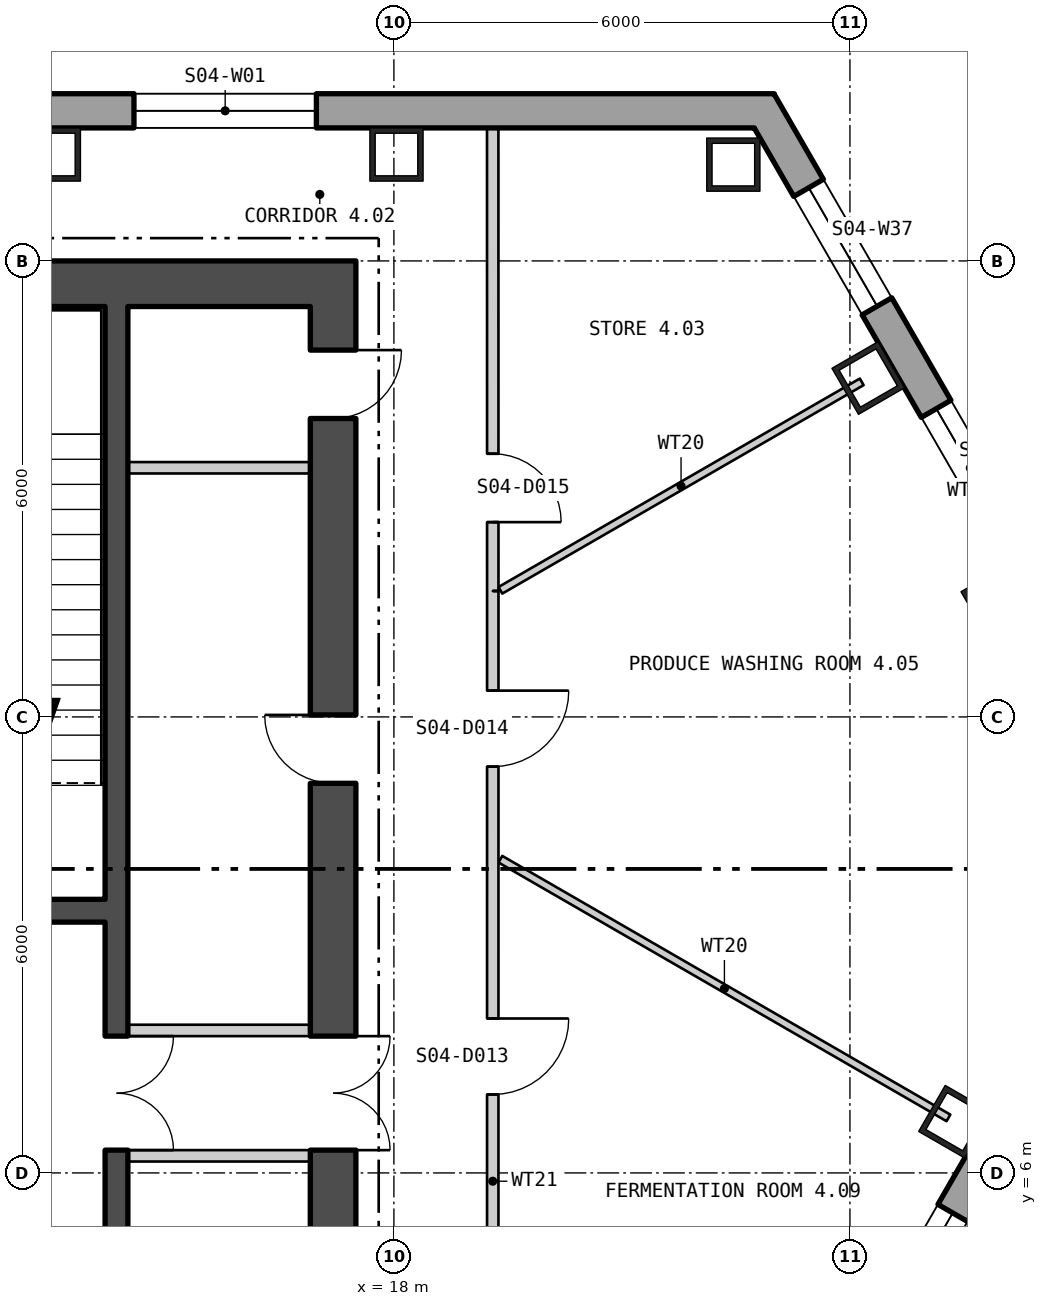
"""IFC4 building model, lengths in metres.
Left out: names, types, materials, properties, quantities, classifications, styles, units other than length and angle.
Written with IfcOpenShell. Run it as: python <this file> out.ifc"""

import sys

from ifc_helpers import new_model, si_unit, direction, frame, frame_2d, origin, origin_2d, place, context, subcontext, project, spatial, polyline, rectangle, hollow_rectangle, outline, extrude, element, fill, save


model = new_model("IFC4")
c1 = context("Model", 3, precision=1e-05, world=origin(), true_north=direction((0.0, 1.0)))
c2 = subcontext(c1, "Body", "Model", "MODEL_VIEW")
j1 = project(units=[si_unit("LENGTHUNIT", "METRE"), si_unit("PLANEANGLEUNIT", "RADIAN")], contexts=[c1])
p1 = place(None, origin())
s1 = spatial("IfcSite", under=j1, at=p1, CompositionType="ELEMENT")
p2 = place(p1, origin())
s2 = spatial("IfcBuilding", under=s1, at=p2, CompositionType="ELEMENT")
p3 = place(p2, frame((0.0, 0.0, 60.3)))
s3 = spatial("IfcBuildingStorey", under=s2, at=p3, CompositionType="ELEMENT", Elevation=60.3)
for number, where, z_axis, x_axis in (
    (1, (22.466, 19.267, 0.0), (0.0, 0.0, 1.0), (-1.0, 0.0, 0.0)),
    (2, (18.034, 19.4, 0.0), (0.0, 0.0, 1.0), (-1.0, 0.0, 0.0)),
    (3, (13.526, 19.4, 0.0), (0.0, 0.0, 1.0), (-1.0, 0.0, 0.0)),
    (4, (25.382, 6.674, 0.0), (0.0, 0.0, 1.0), (0.5, 0.866, 0.0)),
    (5, (25.939, 13.519, 0.0), (0.0, 0.0, 1.0), (-0.5, 0.866, 0.0)),
    (6, (24.241, 16.459, 0.0), (0.0, 0.0, 1.0), (-0.5, 0.866, 0.0)),
):
    element("IfcColumn", number, at=place(p3, frame(where, z_axis=z_axis, x_axis=x_axis)), inside=s3, PredefinedType="COLUMN", context=c2, shape_type="SweptSolid", body=[
        extrude(hollow_rectangle(XDim=0.7, YDim=0.7, WallThickness=0.07, at=origin_2d()), origin(), (0.0, 0.0, 1.0), 4.5),
    ])
p4 = place(p3, frame((22.875, 19.975, -0.4), z_axis=(0.0, 0.0, 1.0), x_axis=(-1.0, 0.0, 0.0)))
e7 = element("IfcWall", 7, at=p4, inside=s3, PredefinedType="SOLIDWALL", context=c2, shape_type="SweptSolid", body=[
    extrude(outline(polyline([(-0.13, -0.225), (45.88, -0.225), (45.62, 0.225), (0.13, 0.225), (-0.13, -0.225)])), origin(), (0.0, 0.0, 1.0), 4.5),
])
p5 = place(p4, frame((5.895, 0.0, 1.3)))
e8 = element("IfcOpeningElement", 8, at=p5, cuts=e7, PredefinedType="OPENING", context=c2, shape_type="SweptSolid", body=[
    extrude(rectangle(XDim=2.4, YDim=2.6, at=frame_2d((1.2, 1.3))), frame((0.0, 0.235, 0.0), z_axis=(0.0, -1.0, 0.0), x_axis=(1.0, 0.0, 0.0)), (0.0, 0.0, 1.0), 0.47),
])
p6 = place(p4, frame((10.403, 0.0, 1.3)))
e9 = element("IfcOpeningElement", 9, at=p6, cuts=e7, PredefinedType="OPENING", context=c2, shape_type="SweptSolid", body=[
    extrude(rectangle(XDim=2.4, YDim=2.6, at=frame_2d((1.2, 1.3))), frame((0.0, 0.235, 0.0), z_axis=(0.0, -1.0, 0.0), x_axis=(1.0, 0.0, 0.0)), (0.0, 0.0, 1.0), 0.47),
])
p7 = place(p4, frame((14.912, 0.0, 1.3)))
e10 = element("IfcOpeningElement", 10, at=p7, cuts=e7, PredefinedType="OPENING", context=c2, shape_type="SweptSolid", body=[
    extrude(rectangle(XDim=2.4, YDim=2.6, at=frame_2d((1.2, 1.3))), frame((0.0, 0.235, 0.0), z_axis=(0.0, -1.0, 0.0), x_axis=(1.0, 0.0, 0.0)), (0.0, 0.0, 1.0), 0.47),
])
p8 = place(p4, frame((19.421, 0.0, 1.3)))
e11 = element("IfcOpeningElement", 11, at=p8, cuts=e7, PredefinedType="OPENING", context=c2, shape_type="SweptSolid", body=[
    extrude(rectangle(XDim=2.4, YDim=2.6, at=frame_2d((1.2, 1.3))), frame((0.0, 0.235, 0.0), z_axis=(0.0, -1.0, 0.0), x_axis=(1.0, 0.0, 0.0)), (0.0, 0.0, 1.0), 0.47),
])
p9 = place(p4, frame((23.929, 0.0, 1.3)))
e12 = element("IfcOpeningElement", 12, at=p9, cuts=e7, PredefinedType="OPENING", context=c2, shape_type="SweptSolid", body=[
    extrude(rectangle(XDim=2.4, YDim=2.6, at=frame_2d((1.2, 1.3))), frame((0.0, 0.235, 0.0), z_axis=(0.0, -1.0, 0.0), x_axis=(1.0, 0.0, 0.0)), (0.0, 0.0, 1.0), 0.47),
])
p10 = place(p4, frame((28.438, 0.0, 1.3)))
e13 = element("IfcOpeningElement", 13, at=p10, cuts=e7, PredefinedType="OPENING", context=c2, shape_type="SweptSolid", body=[
    extrude(rectangle(XDim=2.4, YDim=2.6, at=frame_2d((1.2, 1.3))), frame((0.0, 0.235, 0.0), z_axis=(0.0, -1.0, 0.0), x_axis=(1.0, 0.0, 0.0)), (0.0, 0.0, 1.0), 0.47),
])
p11 = place(p4, frame((32.947, 0.0, 1.3)))
e14 = element("IfcOpeningElement", 14, at=p11, cuts=e7, PredefinedType="OPENING", context=c2, shape_type="SweptSolid", body=[
    extrude(rectangle(XDim=2.4, YDim=2.6, at=frame_2d((1.2, 1.3))), frame((0.0, 0.235, 0.0), z_axis=(0.0, -1.0, 0.0), x_axis=(1.0, 0.0, 0.0)), (0.0, 0.0, 1.0), 0.47),
])
p12 = place(p4, frame((37.455, 0.0, 1.3)))
e15 = element("IfcOpeningElement", 15, at=p12, cuts=e7, PredefinedType="OPENING", context=c2, shape_type="SweptSolid", body=[
    extrude(rectangle(XDim=2.4, YDim=2.6, at=frame_2d((1.2, 1.3))), frame((0.0, 0.235, 0.0), z_axis=(0.0, -1.0, 0.0), x_axis=(1.0, 0.0, 0.0)), (0.0, 0.0, 1.0), 0.47),
])
p13 = place(p3, frame((5.425, -29.042, -0.18), z_axis=(0.0, 0.0, 1.0), x_axis=(0.499999388847, 0.866025756634, 0.0)))
e16 = element("IfcWall", 16, at=p13, inside=s3, PredefinedType="SOLIDWALL", context=c2, shape_type="SweptSolid", body=[
    extrude(outline(polyline([(-0.13, -0.225), (45.88, -0.225), (45.62, 0.225), (0.13, 0.225), (-0.13, -0.225)])), origin(), (0.0, 0.0, 1.0), 4.28),
])
p14 = place(p13, frame((1.425, 0.0, 1.08)))
e17 = element("IfcOpeningElement", 17, at=p14, cuts=e16, PredefinedType="OPENING", context=c2, shape_type="SweptSolid", body=[
    extrude(rectangle(XDim=2.4, YDim=2.6, at=frame_2d((1.2, 1.3))), frame((0.0, 0.235, 0.0), z_axis=(0.0, -1.0, 0.0), x_axis=(1.0, 0.0, 0.0)), (0.0, 0.0, 1.0), 0.47),
])
p15 = place(p13, frame((5.895, 0.0, 1.08)))
e18 = element("IfcOpeningElement", 18, at=p15, cuts=e16, PredefinedType="OPENING", context=c2, shape_type="SweptSolid", body=[
    extrude(rectangle(XDim=2.4, YDim=2.6, at=frame_2d((1.2, 1.3))), frame((0.0, 0.235, 0.0), z_axis=(0.0, -1.0, 0.0), x_axis=(1.0, 0.0, 0.0)), (0.0, 0.0, 1.0), 0.47),
])
p16 = place(p13, frame((10.403, 0.0, 1.08)))
e19 = element("IfcOpeningElement", 19, at=p16, cuts=e16, PredefinedType="OPENING", context=c2, shape_type="SweptSolid", body=[
    extrude(rectangle(XDim=2.4, YDim=2.6, at=frame_2d((1.2, 1.3))), frame((0.0, 0.235, 0.0), z_axis=(0.0, -1.0, 0.0), x_axis=(1.0, 0.0, 0.0)), (0.0, 0.0, 1.0), 0.47),
])
p17 = place(p13, frame((14.912, 0.0, 1.08)))
e20 = element("IfcOpeningElement", 20, at=p17, cuts=e16, PredefinedType="OPENING", context=c2, shape_type="SweptSolid", body=[
    extrude(rectangle(XDim=2.4, YDim=2.6, at=frame_2d((1.2, 1.3))), frame((0.0, 0.235, 0.0), z_axis=(0.0, -1.0, 0.0), x_axis=(1.0, 0.0, 0.0)), (0.0, 0.0, 1.0), 0.47),
])
p18 = place(p13, frame((19.421, 0.0, 1.08)))
e21 = element("IfcOpeningElement", 21, at=p18, cuts=e16, PredefinedType="OPENING", context=c2, shape_type="SweptSolid", body=[
    extrude(rectangle(XDim=2.4, YDim=2.6, at=frame_2d((1.2, 1.3))), frame((0.0, 0.235, 0.0), z_axis=(0.0, -1.0, 0.0), x_axis=(1.0, 0.0, 0.0)), (0.0, 0.0, 1.0), 0.47),
])
p19 = place(p13, frame((23.929, 0.0, 1.08)))
e22 = element("IfcOpeningElement", 22, at=p19, cuts=e16, PredefinedType="OPENING", context=c2, shape_type="SweptSolid", body=[
    extrude(rectangle(XDim=2.4, YDim=2.6, at=frame_2d((1.2, 1.3))), frame((0.0, 0.235, 0.0), z_axis=(0.0, -1.0, 0.0), x_axis=(1.0, 0.0, 0.0)), (0.0, 0.0, 1.0), 0.47),
])
p20 = place(p13, frame((28.438, 0.0, 1.08)))
e23 = element("IfcOpeningElement", 23, at=p20, cuts=e16, PredefinedType="OPENING", context=c2, shape_type="SweptSolid", body=[
    extrude(rectangle(XDim=2.4, YDim=2.6, at=frame_2d((1.2, 1.3))), frame((0.0, 0.235, 0.0), z_axis=(0.0, -1.0, 0.0), x_axis=(1.0, 0.0, 0.0)), (0.0, 0.0, 1.0), 0.47),
])
p21 = place(p13, frame((32.947, 0.0, 1.08)))
e24 = element("IfcOpeningElement", 24, at=p21, cuts=e16, PredefinedType="OPENING", context=c2, shape_type="SweptSolid", body=[
    extrude(rectangle(XDim=2.4, YDim=2.6, at=frame_2d((1.2, 1.3))), frame((0.0, 0.235, 0.0), z_axis=(0.0, -1.0, 0.0), x_axis=(1.0, 0.0, 0.0)), (0.0, 0.0, 1.0), 0.47),
])
p22 = place(p13, frame((37.455, 0.0, 1.08)))
e25 = element("IfcOpeningElement", 25, at=p22, cuts=e16, PredefinedType="OPENING", context=c2, shape_type="SweptSolid", body=[
    extrude(rectangle(XDim=2.4, YDim=2.6, at=frame_2d((1.2, 1.3))), frame((0.0, 0.235, 0.0), z_axis=(0.0, -1.0, 0.0), x_axis=(1.0, 0.0, 0.0)), (0.0, 0.0, 1.0), 0.47),
])
p23 = place(p13, frame((41.925, 0.0, 1.08)))
e26 = element("IfcOpeningElement", 26, at=p23, cuts=e16, PredefinedType="OPENING", context=c2, shape_type="SweptSolid", body=[
    extrude(rectangle(XDim=2.4, YDim=2.6, at=frame_2d((1.2, 1.3))), frame((0.0, 0.235, 0.0), z_axis=(0.0, -1.0, 0.0), x_axis=(1.0, 0.0, 0.0)), (0.0, 0.0, 1.0), 0.47),
])
p24 = place(p3, frame((28.296, 10.576, -0.4), z_axis=(0.0, 0.0, 1.0), x_axis=(-0.500001948972, 0.866024278542, 0.0)))
e27 = element("IfcWall", 27, at=p24, inside=s3, PredefinedType="SOLIDWALL", context=c2, shape_type="SweptSolid", body=[
    extrude(outline(polyline([(-0.13, -0.225), (10.98, -0.225), (10.72, 0.225), (0.13, 0.225), (-0.13, -0.225)])), origin(), (0.0, 0.0, 1.0), 4.5),
])
p25 = place(p24, frame((1.168, 0.0, 1.3)))
e28 = element("IfcOpeningElement", 28, at=p25, cuts=e27, PredefinedType="OPENING", context=c2, shape_type="SweptSolid", body=[
    extrude(rectangle(XDim=1.8, YDim=2.6, at=frame_2d((0.9, 1.3))), frame((0.0, 0.235, 0.0), z_axis=(0.0, -1.0, 0.0), x_axis=(1.0, 0.0, 0.0)), (0.0, 0.0, 1.0), 0.47),
])
p26 = place(p24, frame((4.525, 0.0, 1.3)))
e29 = element("IfcOpeningElement", 29, at=p26, cuts=e27, PredefinedType="OPENING", context=c2, shape_type="SweptSolid", body=[
    extrude(rectangle(XDim=1.8, YDim=2.6, at=frame_2d((0.9, 1.3))), frame((0.0, 0.235, 0.0), z_axis=(0.0, -1.0, 0.0), x_axis=(1.0, 0.0, 0.0)), (0.0, 0.0, 1.0), 0.47),
])
p27 = place(p24, frame((7.882, 0.0, 1.3)))
e30 = element("IfcOpeningElement", 30, at=p27, cuts=e27, PredefinedType="OPENING", context=c2, shape_type="SweptSolid", body=[
    extrude(rectangle(XDim=1.8, YDim=2.6, at=frame_2d((0.9, 1.3))), frame((0.0, 0.235, 0.0), z_axis=(0.0, -1.0, 0.0), x_axis=(1.0, 0.0, 0.0)), (0.0, 0.0, 1.0), 0.47),
])
p28 = place(p3, frame((-17.5, 17.7, 0.0), z_axis=(0.0, 0.0, 1.0), x_axis=(1.0, 0.0, 0.0)))
e31 = element("IfcWall", 31, at=p28, inside=s3, PredefinedType="SHEAR", context=c2, shape_type="SweptSolid", body=[
    extrude(rectangle(XDim=35.0, YDim=0.6, at=frame_2d((17.5, 0.0))), origin(), (0.0, 0.0, 1.0), 4.3),
])
p29 = place(p3, frame((17.2, 0.6, 0.0), z_axis=(0.0, 0.0, 1.0), x_axis=(0.0, 1.0, 0.0)))
e32 = element("IfcWall", 32, at=p29, inside=s3, PredefinedType="SHEAR", context=c2, shape_type="SweptSolid", body=[
    extrude(rectangle(XDim=16.8, YDim=0.6, at=frame_2d((8.4, 0.0))), origin(), (0.0, 0.0, 1.0), 4.3),
])
p30 = place(p29, frame((5.7, 0.0, 0.0)))
e33 = element("IfcOpeningElement", 33, at=p30, cuts=e32, PredefinedType="OPENING", context=c2, shape_type="SweptSolid", body=[
    extrude(rectangle(XDim=1.5, YDim=2.1, at=frame_2d((0.75, 1.05))), frame((0.0, 0.31, 0.0), z_axis=(0.0, -1.0, 0.0), x_axis=(1.0, 0.0, 0.0)), (0.0, 0.0, 1.0), 0.62),
])
p31 = place(p29, frame((0.454, 0.0, 0.0)))
e34 = element("IfcOpeningElement", 34, at=p31, cuts=e32, PredefinedType="OPENING", context=c2, shape_type="SweptSolid", body=[
    extrude(rectangle(XDim=1.0, YDim=2.1, at=frame_2d((0.5, 1.05))), frame((0.0, 0.31, 0.0), z_axis=(0.0, -1.0, 0.0), x_axis=(1.0, 0.0, 0.0)), (0.0, 0.0, 1.0), 0.62),
])
p32 = place(p29, frame((3.354, 0.0, 0.0)))
e35 = element("IfcOpeningElement", 35, at=p32, cuts=e32, PredefinedType="OPENING", context=c2, shape_type="SweptSolid", body=[
    extrude(rectangle(XDim=0.9, YDim=2.1, at=frame_2d((0.45, 1.05))), frame((0.0, 0.31, 0.0), z_axis=(0.0, -1.0, 0.0), x_axis=(1.0, 0.0, 0.0)), (0.0, 0.0, 1.0), 0.62),
])
p33 = place(p29, frame((10.527, 0.0, 0.0)))
e36 = element("IfcOpeningElement", 36, at=p33, cuts=e32, PredefinedType="OPENING", context=c2, shape_type="SweptSolid", body=[
    extrude(rectangle(XDim=0.9, YDim=2.1, at=frame_2d((0.45, 1.05))), frame((0.0, 0.31, 0.0), z_axis=(0.0, -1.0, 0.0), x_axis=(1.0, 0.0, 0.0)), (0.0, 0.0, 1.0), 0.62),
])
p34 = place(p29, frame((15.327, 0.0, 0.0)))
e37 = element("IfcOpeningElement", 37, at=p34, cuts=e32, PredefinedType="OPENING", context=c2, shape_type="SweptSolid", body=[
    extrude(rectangle(XDim=0.9, YDim=2.1, at=frame_2d((0.45, 1.05))), frame((0.0, 0.31, 0.0), z_axis=(0.0, -1.0, 0.0), x_axis=(1.0, 0.0, 0.0)), (0.0, 0.0, 1.0), 0.62),
])
p35 = place(p3, frame((14.35, 0.6, 0.0), z_axis=(0.0, 0.0, 1.0), x_axis=(0.0, 1.0, 0.0)))
e38 = element("IfcWall", 38, at=p35, inside=s3, PredefinedType="SHEAR", context=c2, shape_type="SweptSolid", body=[
    extrude(rectangle(XDim=16.8, YDim=0.3, at=frame_2d((8.4, 0.0))), origin(), (0.0, 0.0, 1.0), 4.3),
])
p36 = place(p35, frame((5.7, 0.0, 0.0)))
e39 = element("IfcOpeningElement", 39, at=p36, cuts=e38, PredefinedType="OPENING", context=c2, shape_type="SweptSolid", body=[
    extrude(rectangle(XDim=1.5, YDim=2.1, at=frame_2d((0.75, 1.05))), frame((0.0, 0.16, 0.0), z_axis=(0.0, -1.0, 0.0), x_axis=(1.0, 0.0, 0.0)), (0.0, 0.0, 1.0), 0.32),
])
p37 = place(p3, frame((11.0, 9.45, 0.0), z_axis=(0.0, 0.0, 1.0), x_axis=(1.0, 0.0, 0.0)))
e40 = element("IfcWall", 40, at=p37, inside=s3, PredefinedType="SHEAR", context=c2, shape_type="SweptSolid", body=[
    extrude(rectangle(XDim=3.2, YDim=0.3, at=frame_2d((1.6, 0.0))), origin(), (0.0, 0.0, 1.0), 4.3),
])
p38 = place(p37, frame((1.0, 0.0, 0.0)))
e41 = element("IfcOpeningElement", 41, at=p38, cuts=e40, PredefinedType="OPENING", context=c2, shape_type="SweptSolid", body=[
    extrude(rectangle(XDim=1.2, YDim=2.1, at=frame_2d((0.6, 1.05))), frame((0.0, 0.16, 0.0), z_axis=(0.0, -1.0, 0.0), x_axis=(1.0, 0.0, 0.0)), (0.0, 0.0, 1.0), 0.32),
])
for number, where, z_axis, x_axis in (
    (42, (14.5, 6.225, 0.0), (0.0, 0.0, 1.0), (1.0, 0.0, 0.0)),
    (43, (14.5, 7.875, 0.0), (0.0, 0.0, 1.0), (1.0, 0.0, 0.0)),
    (44, (14.5, 15.278, 0.0), (0.0, 0.0, 1.0), (1.0, 0.0, 0.0)),
):
    element("IfcWall", number, at=place(p3, frame(where, z_axis=z_axis, x_axis=x_axis)), inside=s3, PredefinedType="PARTITIONING", context=c2, shape_type="SweptSolid", body=[
        extrude(rectangle(XDim=2.4, YDim=0.15, at=frame_2d((1.2, 0.0))), origin(), (0.0, 0.0, 1.0), 4.3),
    ])
p39 = place(p3, frame((19.3, -1.875, 0.0), z_axis=(0.0, 0.0, 1.0), x_axis=(6.4383209e-05, 0.999999997927, 0.0)))
e45 = element("IfcWall", 45, at=p39, inside=s3, PredefinedType="PARTITIONING", context=c2, shape_type="SweptSolid", body=[
    extrude(rectangle(XDim=15.532, YDim=0.15, at=frame_2d((7.766, 0.0))), origin(), (0.0, 0.0, 1.0), 4.3),
])
p40 = place(p39, frame((5.153, 0.0, 0.0)))
e46 = element("IfcOpeningElement", 46, at=p40, cuts=e45, PredefinedType="OPENING", context=c2, shape_type="SweptSolid", body=[
    extrude(rectangle(XDim=0.9, YDim=2.1, at=frame_2d((0.45, 1.05))), frame((0.0, 0.085, 0.0), z_axis=(0.0, -1.0, 0.0), x_axis=(1.0, 0.0, 0.0)), (0.0, 0.0, 1.0), 0.17),
])
p41 = place(p39, frame((8.907, 0.0, 0.0)))
e47 = element("IfcOpeningElement", 47, at=p41, cuts=e45, PredefinedType="OPENING", context=c2, shape_type="SweptSolid", body=[
    extrude(rectangle(XDim=1.0, YDim=2.1, at=frame_2d((0.5, 1.05))), frame((0.0, 0.085, 0.0), z_axis=(0.0, -1.0, 0.0), x_axis=(1.0, 0.0, 0.0)), (0.0, 0.0, 1.0), 0.17),
])
p42 = place(p39, frame((13.221, 0.0, 0.0)))
e48 = element("IfcOpeningElement", 48, at=p42, cuts=e45, PredefinedType="OPENING", context=c2, shape_type="SweptSolid", body=[
    extrude(rectangle(XDim=1.0, YDim=2.1, at=frame_2d((0.5, 1.05))), frame((0.0, 0.085, 0.0), z_axis=(0.0, -1.0, 0.0), x_axis=(1.0, 0.0, 0.0)), (0.0, 0.0, 1.0), 0.17),
])
p43 = place(p3, frame((19.3, 19.749, 0.0), z_axis=(0.0, 0.0, 1.0), x_axis=(0.000164149702, -0.999999986527, 0.0)))
e49 = element("IfcWall", 49, at=p43, inside=s3, PredefinedType="PARTITIONING", context=c2, shape_type="SweptSolid", body=[
    extrude(rectangle(XDim=6.092, YDim=0.15, at=frame_2d((3.046, 0.0))), origin(), (0.0, 0.0, 1.0), 4.3),
])
p44 = place(p43, frame((4.286, 0.0, 0.0)))
e50 = element("IfcOpeningElement", 50, at=p44, cuts=e49, PredefinedType="OPENING", context=c2, shape_type="SweptSolid", body=[
    extrude(rectangle(XDim=0.9, YDim=2.1, at=frame_2d((0.45, 1.05))), frame((0.0, 0.085, 0.0), z_axis=(0.0, -1.0, 0.0), x_axis=(1.0, 0.0, 0.0)), (0.0, 0.0, 1.0), 0.17),
])
p45 = place(p3, frame((19.401, 10.128, 0.0), z_axis=(0.0, 0.0, 1.0), x_axis=(0.865992313895, -0.50005730899, 0.0)))
e51 = element("IfcWall", 51, at=p45, inside=s3, PredefinedType="PARTITIONING", context=c2, shape_type="SweptSolid", body=[
    extrude(rectangle(XDim=6.807, YDim=0.1, at=frame_2d((3.404, 0.0))), origin(), (0.0, 0.0, 1.0), 4.3),
])
p46 = place(p3, frame((19.401, 13.666, 0.0), z_axis=(0.0, 0.0, 1.0), x_axis=(0.866161319146, 0.499764513761, 0.0)))
e52 = element("IfcWall", 52, at=p46, inside=s3, PredefinedType="PARTITIONING", context=c2, shape_type="SweptSolid", body=[
    extrude(rectangle(XDim=5.489, YDim=0.1, at=frame_2d((2.744, 0.0))), origin(), (0.0, 0.0, 1.0), 4.3),
])
p47 = place(p5, origin())
e53 = element("IfcWindow", 53, at=p47, inside=s3, PartitioningType="SINGLE_PANEL", PredefinedType="WINDOW", context=c2, shape_type="SweptSolid", body=[
    extrude(rectangle(XDim=2.4, YDim=2.6, at=frame_2d((1.2, 1.3))), frame((0.0, 0.105, 0.0), z_axis=(0.0, -1.0, 0.0), x_axis=(1.0, 0.0, 0.0)), (0.0, 0.0, 1.0), 0.06),
])
fill(e8, e53)
p48 = place(p22, origin())
e54 = element("IfcWindow", 54, at=p48, inside=s3, PartitioningType="SINGLE_PANEL", PredefinedType="WINDOW", context=c2, shape_type="SweptSolid", body=[
    extrude(rectangle(XDim=2.4, YDim=2.6, at=frame_2d((1.2, 1.3))), frame((0.0, 0.105, 0.0), z_axis=(0.0, -1.0, 0.0), x_axis=(1.0, 0.0, 0.0)), (0.0, 0.0, 1.0), 0.06),
])
fill(e25, e54)
p49 = place(p26, origin())
e55 = element("IfcWindow", 55, at=p49, inside=s3, PartitioningType="SINGLE_PANEL", PredefinedType="WINDOW", context=c2, shape_type="SweptSolid", body=[
    extrude(rectangle(XDim=1.8, YDim=2.6, at=frame_2d((0.9, 1.3))), frame((0.0, 0.105, 0.0), z_axis=(0.0, -1.0, 0.0), x_axis=(1.0, 0.0, 0.0)), (0.0, 0.0, 1.0), 0.06),
])
fill(e29, e55)
p50 = place(p27, origin())
e56 = element("IfcWindow", 56, at=p50, inside=s3, PartitioningType="SINGLE_PANEL", PredefinedType="WINDOW", context=c2, shape_type="SweptSolid", body=[
    extrude(rectangle(XDim=1.8, YDim=2.6, at=frame_2d((0.9, 1.3))), frame((0.0, 0.105, 0.0), z_axis=(0.0, -1.0, 0.0), x_axis=(1.0, 0.0, 0.0)), (0.0, 0.0, 1.0), 0.06),
])
fill(e30, e56)
p51 = place(p36, origin())
e57 = element("IfcDoor", 57, at=p51, inside=s3, OperationType="DOUBLE_DOOR_SINGLE_SWING", PredefinedType="DOOR", context=c2, shape_type="SweptSolid", body=[
    extrude(rectangle(XDim=1.5, YDim=2.1, at=frame_2d((0.75, 1.05))), frame((0.0, 0.025, 0.0), z_axis=(0.0, -1.0, 0.0), x_axis=(1.0, 0.0, 0.0)), (0.0, 0.0, 1.0), 0.05),
])
fill(e39, e57)
p52 = place(p30, origin())
e58 = element("IfcDoor", 58, at=p52, inside=s3, OperationType="DOUBLE_DOOR_SINGLE_SWING", PredefinedType="DOOR", context=c2, shape_type="SweptSolid", body=[
    extrude(rectangle(XDim=1.5, YDim=2.1, at=frame_2d((0.75, 1.05))), frame((0.0, 0.025, 0.0), z_axis=(0.0, -1.0, 0.0), x_axis=(1.0, 0.0, 0.0)), (0.0, 0.0, 1.0), 0.05),
])
fill(e33, e58)
p53 = place(p33, origin())
e59 = element("IfcDoor", 59, at=p53, inside=s3, OperationType="SINGLE_SWING_LEFT", PredefinedType="DOOR", context=c2, shape_type="SweptSolid", body=[
    extrude(rectangle(XDim=0.9, YDim=2.1, at=frame_2d((0.45, 1.05))), frame((0.0, 0.025, 0.0), z_axis=(0.0, -1.0, 0.0), x_axis=(1.0, 0.0, 0.0)), (0.0, 0.0, 1.0), 0.05),
])
fill(e36, e59)
p54 = place(p34, origin())
e60 = element("IfcDoor", 60, at=p54, inside=s3, OperationType="SINGLE_SWING_RIGHT", PredefinedType="DOOR", context=c2, shape_type="SweptSolid", body=[
    extrude(rectangle(XDim=0.9, YDim=2.1, at=frame_2d((0.45, 1.05))), frame((0.0, 0.025, 0.0), z_axis=(0.0, -1.0, 0.0), x_axis=(1.0, 0.0, 0.0)), (0.0, 0.0, 1.0), 0.05),
])
fill(e37, e60)
p55 = place(p41, origin())
e61 = element("IfcDoor", 61, at=p55, inside=s3, OperationType="SINGLE_SWING_RIGHT", PredefinedType="DOOR", context=c2, shape_type="SweptSolid", body=[
    extrude(rectangle(XDim=1.0, YDim=2.1, at=frame_2d((0.5, 1.05))), frame((0.0, 0.025, 0.0), z_axis=(0.0, -1.0, 0.0), x_axis=(1.0, 0.0, 0.0)), (0.0, 0.0, 1.0), 0.05),
])
fill(e47, e61)
p56 = place(p42, origin())
e62 = element("IfcDoor", 62, at=p56, inside=s3, OperationType="SINGLE_SWING_RIGHT", PredefinedType="DOOR", context=c2, shape_type="SweptSolid", body=[
    extrude(rectangle(XDim=1.0, YDim=2.1, at=frame_2d((0.5, 1.05))), frame((0.0, 0.025, 0.0), z_axis=(0.0, -1.0, 0.0), x_axis=(1.0, 0.0, 0.0)), (0.0, 0.0, 1.0), 0.05),
])
fill(e48, e62)
p57 = place(p44, origin())
e63 = element("IfcDoor", 63, at=p57, inside=s3, OperationType="SINGLE_SWING_LEFT", PredefinedType="DOOR", context=c2, shape_type="SweptSolid", body=[
    extrude(rectangle(XDim=0.9, YDim=2.1, at=frame_2d((0.45, 1.05))), frame((0.0, 0.025, 0.0), z_axis=(0.0, -1.0, 0.0), x_axis=(1.0, 0.0, 0.0)), (0.0, 0.0, 1.0), 0.05),
])
fill(e50, e63)
save(model, sys.argv[1])
